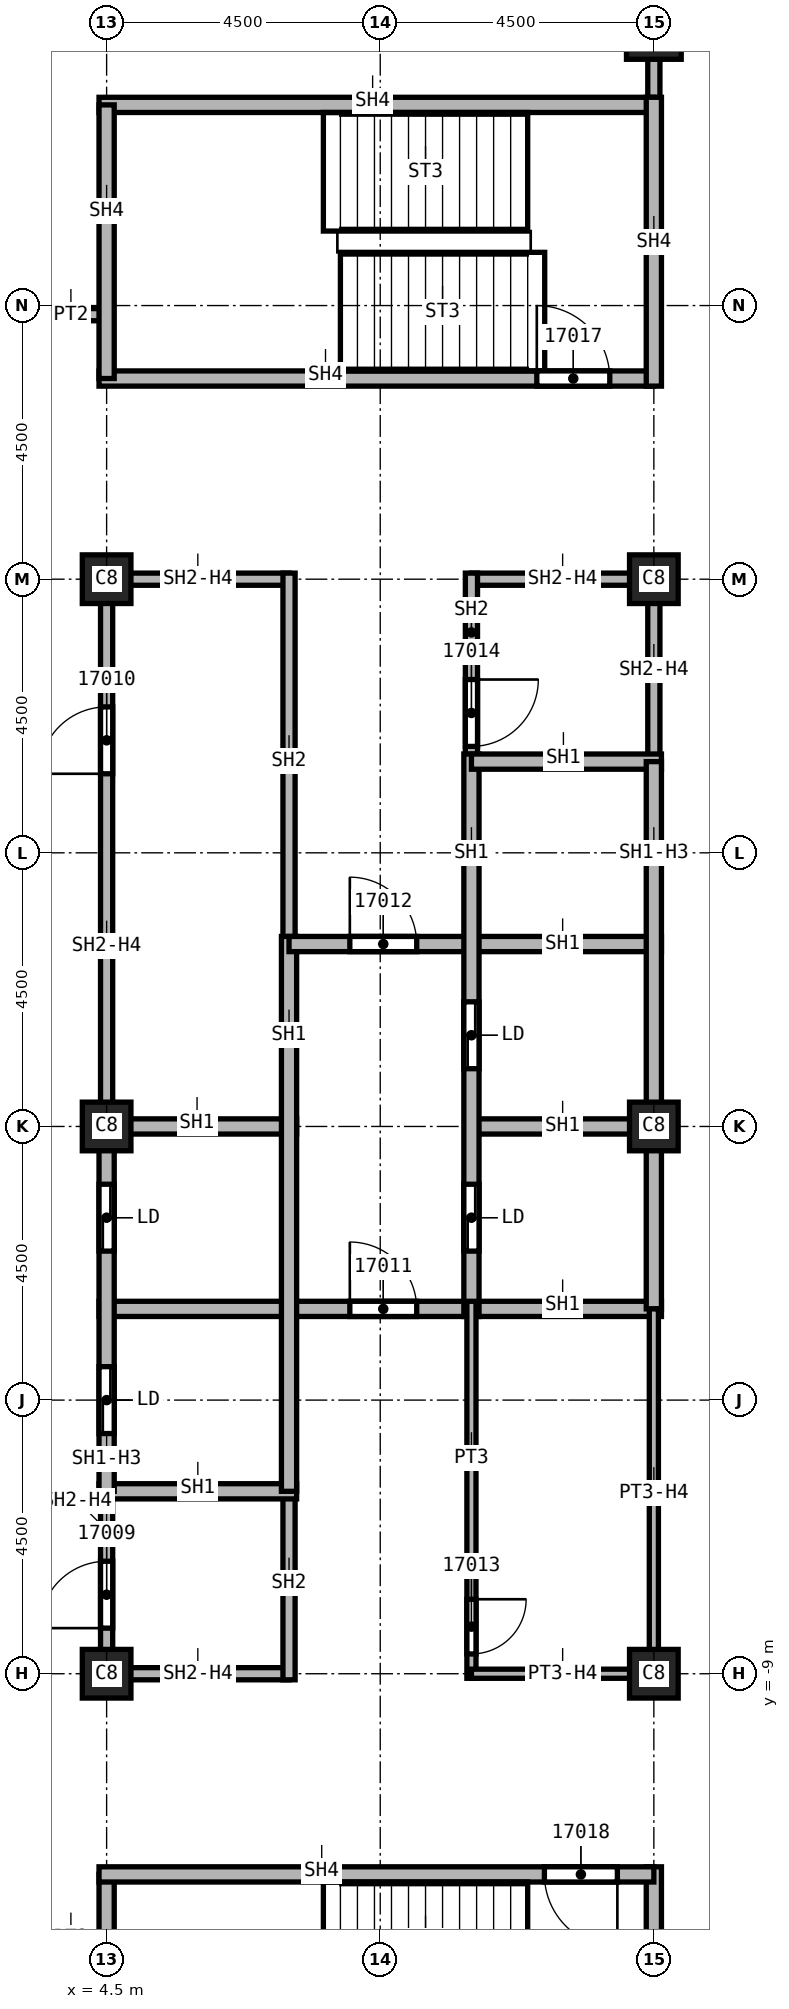
"""IFC4 building model, lengths in metres.
Left out: names, types, materials, properties, quantities, classifications, styles, units other than length and angle.
Written with IfcOpenShell. Run it as: python <this file> out.ifc"""

import sys

from ifc_helpers import new_model, si_unit, direction, frame, frame_2d, origin, origin_2d, place, context, subcontext, project, spatial, rectangle, extrude, element, fill, save


model = new_model("IFC4")
c1 = context("Model", 3, precision=1e-05, world=origin(), true_north=direction((0.0, 1.0)))
c2 = subcontext(c1, "Body", "Model", "MODEL_VIEW")
j1 = project(units=[si_unit("LENGTHUNIT", "METRE"), si_unit("PLANEANGLEUNIT", "RADIAN")], contexts=[c1])
p1 = place(None, origin())
s1 = spatial("IfcSite", under=j1, at=p1, CompositionType="ELEMENT")
p2 = place(p1, origin())
s2 = spatial("IfcBuilding", under=s1, at=p2, CompositionType="ELEMENT")
p3 = place(p2, frame((0.0, 0.0, 254.0)))
s3 = spatial("IfcBuildingStorey", under=s2, at=p3, CompositionType="ELEMENT", Elevation=254.0)
p4 = place(p3, frame((13.5, 18.0, 0.0), z_axis=(0.0, 0.0, 1.0), x_axis=(1.0, 0.0, 0.0)))
e1 = element("IfcColumn", 1, at=p4, inside=s3, PredefinedType="COLUMN", context=c2, shape_type="SweptSolid", body=[
    extrude(rectangle(XDim=0.9, YDim=0.9, at=origin_2d()), origin(), (0.0, 0.0, 1.0), 3.72),
])
for number, where, z_axis, x_axis in (
    (2, (4.5, 0.0, 0.0), (0.0, 0.0, 1.0), (1.0, 0.0, 0.0)),
    (3, (4.5, 9.0, 0.0), (0.0, 0.0, 1.0), (1.0, 0.0, 0.0)),
    (4, (4.5, -9.0, 0.0), (0.0, 0.0, 1.0), (1.0, 0.0, 0.0)),
    (5, (13.5, 0.0, 0.0), (0.0, 0.0, 1.0), (1.0, 0.0, 0.0)),
    (6, (13.5, 9.0, 0.0), (0.0, 0.0, 1.0), (1.0, 0.0, 0.0)),
    (7, (13.5, -9.0, 0.0), (0.0, 0.0, 1.0), (1.0, 0.0, 0.0)),
):
    element("IfcColumn", number, at=place(p3, frame(where, z_axis=z_axis, x_axis=x_axis)), inside=s3, PredefinedType="COLUMN", context=c2, shape_type="SweptSolid", body=[
        extrude(rectangle(XDim=0.8, YDim=0.8, at=origin_2d()), origin(), (0.0, 0.0, 1.0), 3.72),
    ])
p5 = place(p3, frame((3.45, 13.35, 0.0), z_axis=(0.0, 0.0, 1.0), x_axis=(1.0, 0.0, 0.0)))
e8 = element("IfcWall", 8, at=p5, inside=s3, PredefinedType="PARTITIONING", context=c2, shape_type="SweptSolid", body=[
    extrude(rectangle(XDim=1.049, YDim=0.2, at=frame_2d((0.524, 0.0))), origin(), (0.0, 0.0, 1.0), 3.72),
])
p6 = place(p3, frame((13.5, 16.675, 0.0), z_axis=(0.0, 0.0, 1.0), x_axis=(0.0, 1.0, 0.0)))
e9 = element("IfcWall", 9, at=p6, inside=s3, PredefinedType="PARTITIONING", context=c2, shape_type="SweptSolid", body=[
    extrude(rectangle(XDim=5.225, YDim=0.2, at=frame_2d((2.612, 0.0))), origin(), (0.0, 0.0, 1.0), 3.72),
])
p7 = place(p6, frame((2.2, 0.0, 0.0)))
e10 = element("IfcOpeningElement", 10, at=p7, cuts=e9, PredefinedType="OPENING", context=c2, shape_type="SweptSolid", body=[
    extrude(rectangle(XDim=1.0, YDim=2.1, at=frame_2d((0.5, 1.05))), frame((0.0, 0.1, 0.0), z_axis=(0.0, -1.0, 0.0), x_axis=(1.0, 0.0, 0.0)), (0.0, 0.0, 1.0), 0.2),
])
p8 = place(p3, frame((4.5, -9.1, 0.0), z_axis=(0.0, 0.0, 1.0), x_axis=(0.0, 1.0, 0.0)))
e11 = element("IfcWall", 11, at=p8, inside=s3, PredefinedType="SOLIDWALL", context=c2, shape_type="SweptSolid", body=[
    extrude(rectangle(XDim=3.1, YDim=0.2, at=frame_2d((1.55, 0.0))), origin(), (0.0, 0.0, 1.0), 3.042),
])
p9 = place(p8, frame((0.85, 0.0, 0.0)))
e12 = element("IfcOpeningElement", 12, at=p9, cuts=e11, PredefinedType="OPENING", context=c2, shape_type="SweptSolid", body=[
    extrude(rectangle(XDim=1.1, YDim=2.1, at=frame_2d((0.55, 1.05))), frame((0.0, 0.1, 0.0), z_axis=(0.0, -1.0, 0.0), x_axis=(1.0, 0.0, 0.0)), (0.0, 0.0, 1.0), 0.2),
])
p10 = place(p3, frame((4.5, 0.0, 0.0), z_axis=(0.0, 0.0, 1.0), x_axis=(0.0, 1.0, 0.0)))
e13 = element("IfcWall", 13, at=p10, inside=s3, PredefinedType="SOLIDWALL", context=c2, shape_type="SweptSolid", body=[
    extrude(rectangle(XDim=9.1, YDim=0.2, at=frame_2d((4.55, 0.0))), origin(), (0.0, 0.0, 1.0), 3.042),
])
p11 = place(p10, frame((5.8, 0.0, 0.0)))
e14 = element("IfcOpeningElement", 14, at=p11, cuts=e13, PredefinedType="OPENING", context=c2, shape_type="SweptSolid", body=[
    extrude(rectangle(XDim=1.1, YDim=2.1, at=frame_2d((0.55, 1.05))), frame((0.0, 0.1, 0.0), z_axis=(0.0, -1.0, 0.0), x_axis=(1.0, 0.0, 0.0)), (0.0, 0.0, 1.0), 0.2),
])
for number, where, z_axis, x_axis in (
    (15, (4.5, 9.0, 0.0), (0.0, 0.0, 1.0), (1.0, 0.0, 0.0)),
    (16, (7.5, -9.0, 0.0), (0.0, 0.0, 1.0), (-1.0, 0.0, 0.0)),
):
    element("IfcWall", number, at=place(p3, frame(where, z_axis=z_axis, x_axis=x_axis)), inside=s3, PredefinedType="SOLIDWALL", context=c2, shape_type="SweptSolid", body=[
        extrude(rectangle(XDim=3.0, YDim=0.2, at=frame_2d((1.5, 0.0))), origin(), (0.0, 0.0, 1.0), 3.042),
    ])
p12 = place(p3, frame((7.5, -6.0, 0.0), z_axis=(0.0, 0.0, 1.0), x_axis=(0.0, -1.0, 0.0)))
e17 = element("IfcWall", 17, at=p12, inside=s3, PredefinedType="SOLIDWALL", context=c2, shape_type="SweptSolid", body=[
    extrude(rectangle(XDim=3.1, YDim=0.2, at=frame_2d((1.55, 0.0))), origin(), (0.0, 0.0, 1.0), 3.72),
])
p13 = place(p3, frame((7.5, 9.1, 0.0), z_axis=(0.0, 0.0, 1.0), x_axis=(0.0, -1.0, 0.0)))
e18 = element("IfcWall", 18, at=p13, inside=s3, PredefinedType="SOLIDWALL", context=c2, shape_type="SweptSolid", body=[
    extrude(rectangle(XDim=6.225, YDim=0.2, at=frame_2d((3.113, 0.0))), origin(), (0.0, 0.0, 1.0), 3.72),
])
p14 = place(p3, frame((10.5, 9.0, 0.0), z_axis=(0.0, 0.0, 1.0), x_axis=(1.0, 0.0, 0.0)))
e19 = element("IfcWall", 19, at=p14, inside=s3, PredefinedType="SOLIDWALL", context=c2, shape_type="SweptSolid", body=[
    extrude(rectangle(XDim=3.0, YDim=0.2, at=frame_2d((1.5, 0.0))), origin(), (0.0, 0.0, 1.0), 3.042),
])
p15 = place(p3, frame((10.5, 9.1, 0.0), z_axis=(0.0, 0.0, 1.0), x_axis=(0.0, -1.0, 0.0)))
e20 = element("IfcWall", 20, at=p15, inside=s3, PredefinedType="SOLIDWALL", context=c2, shape_type="SweptSolid", body=[
    extrude(rectangle(XDim=3.225, YDim=0.2, at=frame_2d((1.613, 0.0))), origin(), (0.0, 0.0, 1.0), 3.72),
])
p16 = place(p15, frame((1.75, 0.0, 0.0)))
e21 = element("IfcOpeningElement", 21, at=p16, cuts=e20, PredefinedType="OPENING", context=c2, shape_type="SweptSolid", body=[
    extrude(rectangle(XDim=1.1, YDim=2.1, at=frame_2d((0.55, 1.05))), frame((0.0, 0.1, 0.0), z_axis=(0.0, -1.0, 0.0), x_axis=(1.0, 0.0, 0.0)), (0.0, 0.0, 1.0), 0.2),
])
p17 = place(p3, frame((13.5, 9.1, 0.0), z_axis=(0.0, 0.0, 1.0), x_axis=(0.0, -1.0, 0.0)))
e22 = element("IfcWall", 22, at=p17, inside=s3, PredefinedType="SOLIDWALL", context=c2, shape_type="SweptSolid", body=[
    extrude(rectangle(XDim=3.1, YDim=0.2, at=frame_2d((1.55, 0.0))), origin(), (0.0, 0.0, 1.0), 3.042),
])
p18 = place(p3, frame((4.375, -6.0, 0.0), z_axis=(0.0, 0.0, 1.0), x_axis=(1.0, 0.0, 0.0)))
e23 = element("IfcWall", 23, at=p18, inside=s3, PredefinedType="SOLIDWALL", context=c2, shape_type="SweptSolid", body=[
    extrude(rectangle(XDim=3.25, YDim=0.25, at=frame_2d((1.625, 0.0))), origin(), (0.0, 0.0, 1.0), 3.72),
])
p19 = place(p3, frame((4.375, -3.0, 0.0), z_axis=(0.0, 0.0, 1.0), x_axis=(1.0, 0.0, 0.0)))
e24 = element("IfcWall", 24, at=p19, inside=s3, PredefinedType="SOLIDWALL", context=c2, shape_type="SweptSolid", body=[
    extrude(rectangle(XDim=9.25, YDim=0.25, at=frame_2d((4.625, 0.0))), origin(), (0.0, 0.0, 1.0), 3.72),
])
p20 = place(p19, frame((4.125, 0.0, 0.0)))
e25 = element("IfcOpeningElement", 25, at=p20, cuts=e24, PredefinedType="OPENING", context=c2, shape_type="SweptSolid", body=[
    extrude(rectangle(XDim=1.1, YDim=2.1, at=frame_2d((0.55, 1.05))), frame((0.0, 0.125, 0.0), z_axis=(0.0, -1.0, 0.0), x_axis=(1.0, 0.0, 0.0)), (0.0, 0.0, 1.0), 0.25),
])
p21 = place(p3, frame((4.375, 0.0, 0.0), z_axis=(0.0, 0.0, 1.0), x_axis=(1.0, 0.0, 0.0)))
e26 = element("IfcWall", 26, at=p21, inside=s3, PredefinedType="SOLIDWALL", context=c2, shape_type="SweptSolid", body=[
    extrude(rectangle(XDim=3.25, YDim=0.25, at=frame_2d((1.625, 0.0))), origin(), (0.0, 0.0, 1.0), 3.72),
])
p22 = place(p3, frame((4.5, -6.0, 0.0), z_axis=(0.0, 0.0, 1.0), x_axis=(0.0, 1.0, 0.0)))
e27 = element("IfcWall", 27, at=p22, inside=s3, PredefinedType="SOLIDWALL", context=c2, shape_type="SweptSolid", body=[
    extrude(rectangle(XDim=6.0, YDim=0.25, at=frame_2d((3.0, 0.0))), origin(), (0.0, 0.0, 1.0), 3.042),
])
p23 = place(p22, frame((0.95, 0.0, 0.0)))
e28 = element("IfcOpeningElement", 28, at=p23, cuts=e27, PredefinedType="OPENING", context=c2, shape_type="SweptSolid", body=[
    extrude(rectangle(XDim=1.1, YDim=2.1, at=frame_2d((0.55, 1.05))), frame((0.0, 0.125, 0.0), z_axis=(0.0, -1.0, 0.0), x_axis=(1.0, 0.0, 0.0)), (0.0, 0.0, 1.0), 0.25),
])
p24 = place(p22, frame((3.95, 0.0, 0.0)))
e29 = element("IfcOpeningElement", 29, at=p24, cuts=e27, PredefinedType="OPENING", context=c2, shape_type="SweptSolid", body=[
    extrude(rectangle(XDim=1.1, YDim=2.1, at=frame_2d((0.55, 1.05))), frame((0.0, 0.125, 0.0), z_axis=(0.0, -1.0, 0.0), x_axis=(1.0, 0.0, 0.0)), (0.0, 0.0, 1.0), 0.25),
])
p25 = place(p3, frame((7.5, 3.125, 0.0), z_axis=(0.0, 0.0, 1.0), x_axis=(0.0, -1.0, 0.0)))
e30 = element("IfcWall", 30, at=p25, inside=s3, PredefinedType="SOLIDWALL", context=c2, shape_type="SweptSolid", body=[
    extrude(rectangle(XDim=9.125, YDim=0.25, at=frame_2d((4.562, 0.0))), origin(), (0.0, 0.0, 1.0), 3.72),
])
p26 = place(p3, frame((7.5, 3.0, 0.0), z_axis=(0.0, 0.0, 1.0), x_axis=(1.0, 0.0, 0.0)))
e31 = element("IfcWall", 31, at=p26, inside=s3, PredefinedType="SOLIDWALL", context=c2, shape_type="SweptSolid", body=[
    extrude(rectangle(XDim=6.125, YDim=0.25, at=frame_2d((3.062, 0.0))), origin(), (0.0, 0.0, 1.0), 3.72),
])
p27 = place(p26, frame((1.0, 0.0, 0.0)))
e32 = element("IfcOpeningElement", 32, at=p27, cuts=e31, PredefinedType="OPENING", context=c2, shape_type="SweptSolid", body=[
    extrude(rectangle(XDim=1.1, YDim=2.1, at=frame_2d((0.55, 1.05))), frame((0.0, 0.125, 0.0), z_axis=(0.0, -1.0, 0.0), x_axis=(1.0, 0.0, 0.0)), (0.0, 0.0, 1.0), 0.25),
])
p28 = place(p3, frame((10.5, 0.0, 0.0), z_axis=(0.0, 0.0, 1.0), x_axis=(1.0, 0.0, 0.0)))
e33 = element("IfcWall", 33, at=p28, inside=s3, PredefinedType="SOLIDWALL", context=c2, shape_type="SweptSolid", body=[
    extrude(rectangle(XDim=3.125, YDim=0.25, at=frame_2d((1.562, 0.0))), origin(), (0.0, 0.0, 1.0), 3.72),
])
p29 = place(p3, frame((10.5, 6.125, 0.0), z_axis=(0.0, 0.0, 1.0), x_axis=(0.0, -1.0, 0.0)))
e34 = element("IfcWall", 34, at=p29, inside=s3, PredefinedType="SOLIDWALL", context=c2, shape_type="SweptSolid", body=[
    extrude(rectangle(XDim=9.25, YDim=0.25, at=frame_2d((4.625, 0.0))), origin(), (0.0, 0.0, 1.0), 3.72),
])
p30 = place(p29, frame((7.075, 0.0, 0.0)))
e35 = element("IfcOpeningElement", 35, at=p30, cuts=e34, PredefinedType="OPENING", context=c2, shape_type="SweptSolid", body=[
    extrude(rectangle(XDim=1.1, YDim=2.1, at=frame_2d((0.55, 1.05))), frame((0.0, 0.125, 0.0), z_axis=(0.0, -1.0, 0.0), x_axis=(1.0, 0.0, 0.0)), (0.0, 0.0, 1.0), 0.25),
])
p31 = place(p29, frame((4.075, 0.0, 0.0)))
e36 = element("IfcOpeningElement", 36, at=p31, cuts=e34, PredefinedType="OPENING", context=c2, shape_type="SweptSolid", body=[
    extrude(rectangle(XDim=1.1, YDim=2.1, at=frame_2d((0.55, 1.05))), frame((0.0, 0.125, 0.0), z_axis=(0.0, -1.0, 0.0), x_axis=(1.0, 0.0, 0.0)), (0.0, 0.0, 1.0), 0.25),
])
p32 = place(p3, frame((10.5, 6.0, 0.0), z_axis=(0.0, 0.0, 1.0), x_axis=(1.0, 0.0, 0.0)))
e37 = element("IfcWall", 37, at=p32, inside=s3, PredefinedType="SOLIDWALL", context=c2, shape_type="SweptSolid", body=[
    extrude(rectangle(XDim=3.125, YDim=0.25, at=frame_2d((1.562, 0.0))), origin(), (0.0, 0.0, 1.0), 3.72),
])
p33 = place(p3, frame((13.5, 6.0, 0.0), z_axis=(0.0, 0.0, 1.0), x_axis=(0.0, -1.0, 0.0)))
e38 = element("IfcWall", 38, at=p33, inside=s3, PredefinedType="SOLIDWALL", context=c2, shape_type="SweptSolid", body=[
    extrude(rectangle(XDim=9.0, YDim=0.25, at=frame_2d((4.5, 0.0))), origin(), (0.0, 0.0, 1.0), 3.042),
])
p34 = place(p3, frame((4.375, 12.3, 0.0), z_axis=(0.0, 0.0, 1.0), x_axis=(1.0, 0.0, 0.0)))
e39 = element("IfcWall", 39, at=p34, inside=s3, PredefinedType="SOLIDWALL", context=c2, shape_type="SweptSolid", body=[
    extrude(rectangle(XDim=9.125, YDim=0.25, at=frame_2d((4.562, 0.0))), origin(), (0.0, 0.0, 1.0), 3.72),
])
p35 = place(p34, frame((7.2, 0.0, 0.0)))
e40 = element("IfcOpeningElement", 40, at=p35, cuts=e39, PredefinedType="OPENING", context=c2, shape_type="SweptSolid", body=[
    extrude(rectangle(XDim=1.2, YDim=2.1, at=frame_2d((0.6, 1.05))), frame((0.0, 0.125, 0.0), z_axis=(0.0, -1.0, 0.0), x_axis=(1.0, 0.0, 0.0)), (0.0, 0.0, 1.0), 0.25),
])
p36 = place(p3, frame((4.375, 16.8, 0.0), z_axis=(0.0, 0.0, 1.0), x_axis=(1.0, 0.0, 0.0)))
e41 = element("IfcWall", 41, at=p36, inside=s3, PredefinedType="SOLIDWALL", context=c2, shape_type="SweptSolid", body=[
    extrude(rectangle(XDim=9.125, YDim=0.25, at=frame_2d((4.562, 0.0))), origin(), (0.0, 0.0, 1.0), 3.72),
])
for number, where, z_axis, x_axis in (
    (42, (4.5, -16.8, 0.0), (0.0, 0.0, 1.0), (0.0, 1.0, 0.0)),
    (43, (4.5, 12.3, 0.0), (0.0, 0.0, 1.0), (0.0, 1.0, 0.0)),
):
    element("IfcWall", number, at=place(p3, frame(where, z_axis=z_axis, x_axis=x_axis)), inside=s3, PredefinedType="SOLIDWALL", context=c2, shape_type="SweptSolid", body=[
        extrude(rectangle(XDim=4.5, YDim=0.25, at=frame_2d((2.25, 0.0))), origin(), (0.0, 0.0, 1.0), 3.72),
    ])
p37 = place(p3, frame((13.5, -16.925, 0.0), z_axis=(0.0, 0.0, 1.0), x_axis=(0.0, 1.0, 0.0)))
e44 = element("IfcWall", 44, at=p37, inside=s3, PredefinedType="SOLIDWALL", context=c2, shape_type="SweptSolid", body=[
    extrude(rectangle(XDim=4.75, YDim=0.25, at=frame_2d((2.375, 0.0))), origin(), (0.0, 0.0, 1.0), 3.72),
])
p38 = place(p3, frame((13.5, -12.3, 0.0), z_axis=(0.0, 0.0, 1.0), x_axis=(-1.0, 0.0, 0.0)))
e45 = element("IfcWall", 45, at=p38, inside=s3, PredefinedType="SOLIDWALL", context=c2, shape_type="SweptSolid", body=[
    extrude(rectangle(XDim=9.125, YDim=0.25, at=frame_2d((4.562, 0.0))), origin(), (0.0, 0.0, 1.0), 3.72),
])
p39 = place(p38, frame((0.6, 0.0, 0.0)))
e46 = element("IfcOpeningElement", 46, at=p39, cuts=e45, PredefinedType="OPENING", context=c2, shape_type="SweptSolid", body=[
    extrude(rectangle(XDim=1.2, YDim=2.1, at=frame_2d((0.6, 1.05))), frame((0.0, 0.125, 0.0), z_axis=(0.0, -1.0, 0.0), x_axis=(1.0, 0.0, 0.0)), (0.0, 0.0, 1.0), 0.25),
])
p40 = place(p3, frame((13.5, 12.175, 0.0), z_axis=(0.0, 0.0, 1.0), x_axis=(0.0, 1.0, 0.0)))
e47 = element("IfcWall", 47, at=p40, inside=s3, PredefinedType="SOLIDWALL", context=c2, shape_type="SweptSolid", body=[
    extrude(rectangle(XDim=4.75, YDim=0.25, at=frame_2d((2.375, 0.0))), origin(), (0.0, 0.0, 1.0), 3.72),
])
p41 = place(p3, frame((10.5, -2.875, 0.0), z_axis=(0.0, 0.0, 1.0), x_axis=(0.0, -1.0, 0.0)))
e48 = element("IfcWall", 48, at=p41, inside=s3, PredefinedType="PARTITIONING", context=c2, shape_type="SweptSolid", body=[
    extrude(rectangle(XDim=6.2, YDim=0.15, at=frame_2d((3.1, 0.0))), origin(), (0.0, 0.0, 1.0), 3.72),
])
p42 = place(p41, frame((4.9, 0.0, 0.0)))
e49 = element("IfcOpeningElement", 49, at=p42, cuts=e48, PredefinedType="OPENING", context=c2, shape_type="SweptSolid", body=[
    extrude(rectangle(XDim=0.9, YDim=2.1, at=frame_2d((0.45, 1.05))), frame((0.0, 0.075, 0.0), z_axis=(0.0, -1.0, 0.0), x_axis=(1.0, 0.0, 0.0)), (0.0, 0.0, 1.0), 0.15),
])
p43 = place(p3, frame((13.5, -9.0, 0.0), z_axis=(0.0, 0.0, 1.0), x_axis=(-1.0, 0.0, 0.0)))
e50 = element("IfcWall", 50, at=p43, inside=s3, PredefinedType="PARTITIONING", context=c2, shape_type="SweptSolid", body=[
    extrude(rectangle(XDim=3.0, YDim=0.15, at=frame_2d((1.5, 0.0))), origin(), (0.0, 0.0, 1.0), 3.042),
])
p44 = place(p3, frame((13.5, -3.0, 0.0), z_axis=(0.0, 0.0, 1.0), x_axis=(0.0, -1.0, 0.0)))
e51 = element("IfcWall", 51, at=p44, inside=s3, PredefinedType="PARTITIONING", context=c2, shape_type="SweptSolid", body=[
    extrude(rectangle(XDim=6.075, YDim=0.15, at=frame_2d((3.038, 0.0))), origin(), (0.0, 0.0, 1.0), 3.042),
])
p45 = place(p9, origin())
e52 = element("IfcDoor", 52, at=p45, inside=s3, OperationType="SINGLE_SWING_RIGHT", PredefinedType="DOOR", context=c2, shape_type="SweptSolid", body=[
    extrude(rectangle(XDim=1.1, YDim=2.1, at=frame_2d((0.55, 1.05))), frame((0.0, 0.025, 0.0), z_axis=(0.0, -1.0, 0.0), x_axis=(1.0, 0.0, 0.0)), (0.0, 0.0, 1.0), 0.05),
])
fill(e12, e52)
p46 = place(p11, origin())
e53 = element("IfcDoor", 53, at=p46, inside=s3, OperationType="SINGLE_SWING_LEFT", PredefinedType="DOOR", context=c2, shape_type="SweptSolid", body=[
    extrude(rectangle(XDim=1.1, YDim=2.1, at=frame_2d((0.55, 1.05))), frame((0.0, 0.025, 0.0), z_axis=(0.0, -1.0, 0.0), x_axis=(1.0, 0.0, 0.0)), (0.0, 0.0, 1.0), 0.05),
])
fill(e14, e53)
p47 = place(p20, origin())
e54 = element("IfcDoor", 54, at=p47, inside=s3, OperationType="SINGLE_SWING_RIGHT", PredefinedType="DOOR", context=c2, shape_type="SweptSolid", body=[
    extrude(rectangle(XDim=1.1, YDim=2.1, at=frame_2d((0.55, 1.05))), frame((0.0, 0.025, 0.0), z_axis=(0.0, -1.0, 0.0), x_axis=(1.0, 0.0, 0.0)), (0.0, 0.0, 1.0), 0.05),
])
fill(e25, e54)
p48 = place(p27, origin())
e55 = element("IfcDoor", 55, at=p48, inside=s3, OperationType="SINGLE_SWING_LEFT", PredefinedType="DOOR", context=c2, shape_type="SweptSolid", body=[
    extrude(rectangle(XDim=1.1, YDim=2.1, at=frame_2d((0.55, 1.05))), frame((0.0, 0.025, 0.0), z_axis=(0.0, -1.0, 0.0), x_axis=(1.0, 0.0, 0.0)), (0.0, 0.0, 1.0), 0.05),
])
fill(e32, e55)
p49 = place(p42, origin())
e56 = element("IfcDoor", 56, at=p49, inside=s3, OperationType="SINGLE_SWING_RIGHT", PredefinedType="DOOR", context=c2, shape_type="SweptSolid", body=[
    extrude(rectangle(XDim=0.9, YDim=2.1, at=frame_2d((0.45, 1.05))), frame((0.0, 0.025, 0.0), z_axis=(0.0, -1.0, 0.0), x_axis=(1.0, 0.0, 0.0)), (0.0, 0.0, 1.0), 0.05),
])
fill(e49, e56)
p50 = place(p16, origin())
e57 = element("IfcDoor", 57, at=p50, inside=s3, OperationType="SINGLE_SWING_LEFT", PredefinedType="DOOR", context=c2, shape_type="SweptSolid", body=[
    extrude(rectangle(XDim=1.1, YDim=2.1, at=frame_2d((0.55, 1.05))), frame((0.0, 0.025, 0.0), z_axis=(0.0, -1.0, 0.0), x_axis=(1.0, 0.0, 0.0)), (0.0, 0.0, 1.0), 0.05),
])
fill(e21, e57)
p51 = place(p35, origin())
e58 = element("IfcDoor", 58, at=p51, inside=s3, OperationType="SINGLE_SWING_RIGHT", PredefinedType="DOOR", context=c2, shape_type="SweptSolid", body=[
    extrude(rectangle(XDim=1.2, YDim=2.1, at=frame_2d((0.6, 1.05))), frame((0.0, 0.025, 0.0), z_axis=(0.0, -1.0, 0.0), x_axis=(1.0, 0.0, 0.0)), (0.0, 0.0, 1.0), 0.05),
])
fill(e40, e58)
p52 = place(p39, origin())
e59 = element("IfcDoor", 59, at=p52, inside=s3, OperationType="SINGLE_SWING_LEFT", PredefinedType="DOOR", context=c2, shape_type="SweptSolid", body=[
    extrude(rectangle(XDim=1.2, YDim=2.1, at=frame_2d((0.6, 1.05))), frame((0.0, 0.025, 0.0), z_axis=(0.0, -1.0, 0.0), x_axis=(1.0, 0.0, 0.0)), (0.0, 0.0, 1.0), 0.05),
])
fill(e46, e59)
p53 = place(p23, origin())
e60 = element("IfcDoor", 60, at=p53, inside=s3, OperationType="SLIDING_TO_LEFT", PredefinedType="DOOR", context=c2, shape_type="SweptSolid", body=[
    extrude(rectangle(XDim=1.1, YDim=2.1, at=frame_2d((0.55, 1.05))), frame((0.0, 0.025, 0.0), z_axis=(0.0, -1.0, 0.0), x_axis=(1.0, 0.0, 0.0)), (0.0, 0.0, 1.0), 0.05),
])
fill(e28, e60)
p54 = place(p24, origin())
e61 = element("IfcDoor", 61, at=p54, inside=s3, OperationType="SLIDING_TO_LEFT", PredefinedType="DOOR", context=c2, shape_type="SweptSolid", body=[
    extrude(rectangle(XDim=1.1, YDim=2.1, at=frame_2d((0.55, 1.05))), frame((0.0, 0.025, 0.0), z_axis=(0.0, -1.0, 0.0), x_axis=(1.0, 0.0, 0.0)), (0.0, 0.0, 1.0), 0.05),
])
fill(e29, e61)
p55 = place(p30, origin())
e62 = element("IfcDoor", 62, at=p55, inside=s3, OperationType="SLIDING_TO_LEFT", PredefinedType="DOOR", context=c2, shape_type="SweptSolid", body=[
    extrude(rectangle(XDim=1.1, YDim=2.1, at=frame_2d((0.55, 1.05))), frame((0.0, 0.025, 0.0), z_axis=(0.0, -1.0, 0.0), x_axis=(1.0, 0.0, 0.0)), (0.0, 0.0, 1.0), 0.05),
])
fill(e35, e62)
p56 = place(p31, origin())
e63 = element("IfcDoor", 63, at=p56, inside=s3, OperationType="SLIDING_TO_LEFT", PredefinedType="DOOR", context=c2, shape_type="SweptSolid", body=[
    extrude(rectangle(XDim=1.1, YDim=2.1, at=frame_2d((0.55, 1.05))), frame((0.0, 0.025, 0.0), z_axis=(0.0, -1.0, 0.0), x_axis=(1.0, 0.0, 0.0)), (0.0, 0.0, 1.0), 0.05),
])
fill(e36, e63)
save(model, sys.argv[1])
